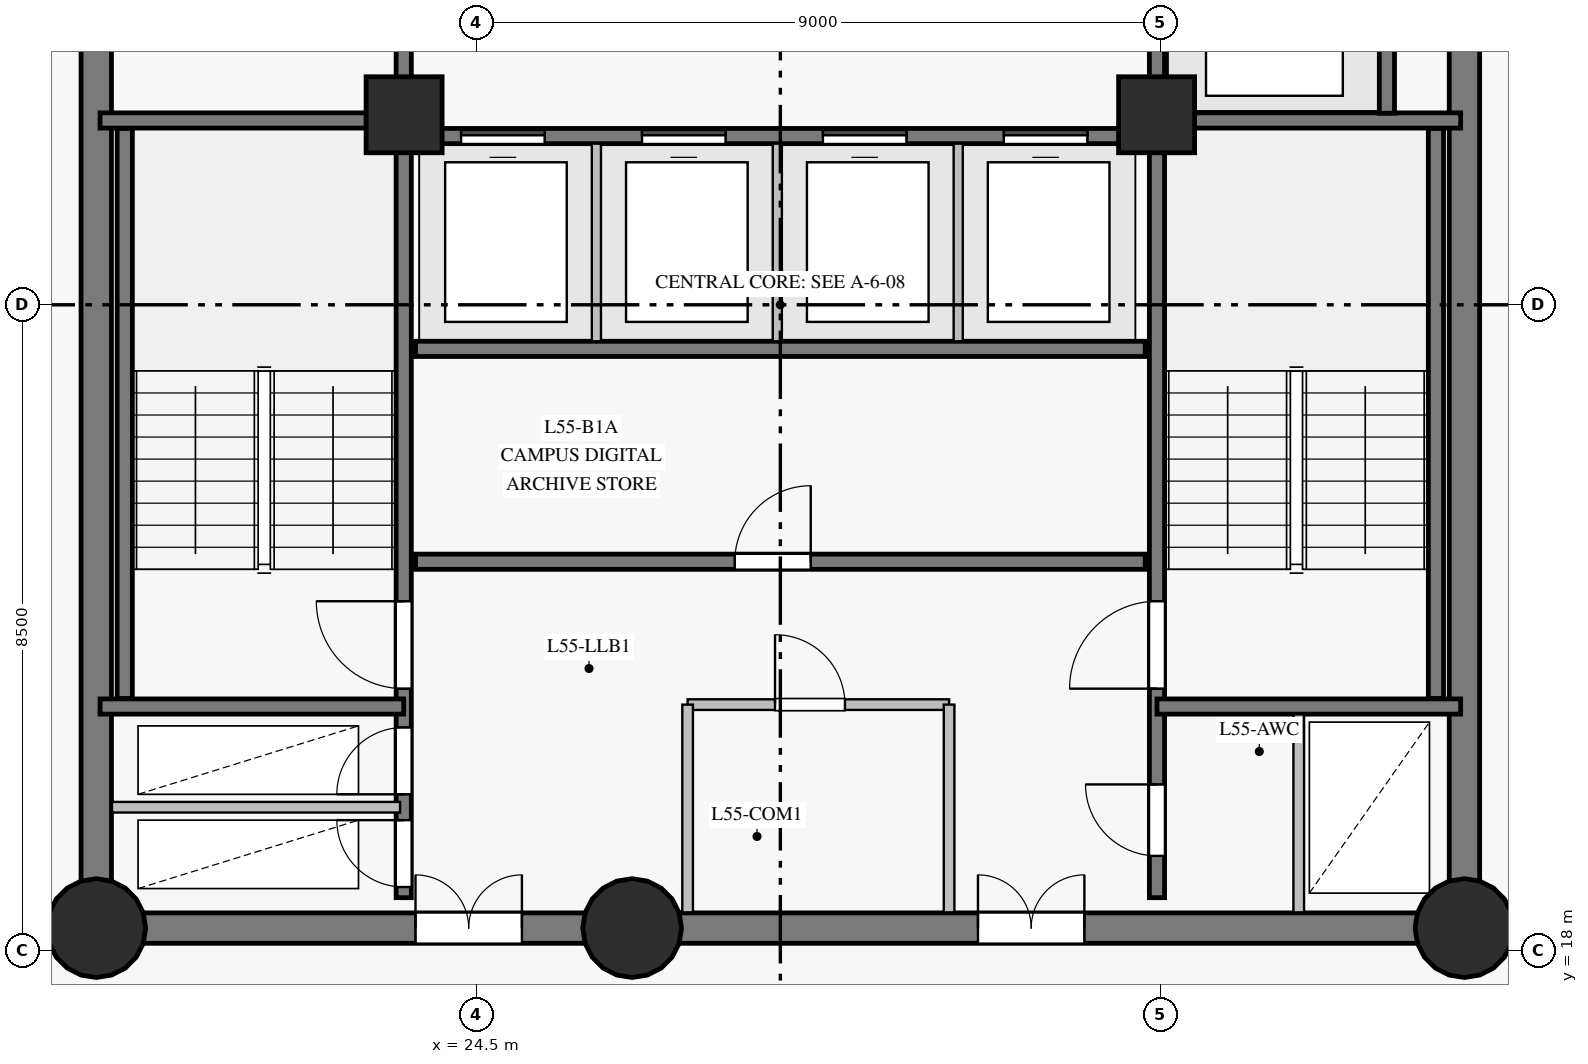
"""IFC4 building model, lengths in metres.
Left out: names, types, materials, properties, quantities, classifications, styles, units other than length and angle.
Written with IfcOpenShell. Run it as: python <this file> out.ifc"""

import sys

from ifc_helpers import new_model, si_unit, direction, frame, frame_2d, origin, origin_with_axes, origin_2d, place, context, subcontext, project, spatial, rectangle, circle, extrude, source, transform, mapped, element, fill, save


model = new_model("IFC4")
c1 = context("Model", 3, precision=1e-05, world=origin(), true_north=direction((0.0, 1.0)))
c2 = subcontext(c1, "Body", "Model", "MODEL_VIEW")
j1 = project(units=[si_unit("LENGTHUNIT", "METRE"), si_unit("PLANEANGLEUNIT", "RADIAN")], contexts=[c1])
p1 = place(None, origin())
s1 = spatial("IfcSite", under=j1, at=p1, CompositionType="ELEMENT")
p2 = place(p1, origin())
s2 = spatial("IfcBuilding", under=s1, at=p2, CompositionType="ELEMENT")
p3 = place(p2, frame((0.0, 0.0, 190.1)))
s3 = spatial("IfcBuildingStorey", under=s2, at=p3, CompositionType="ELEMENT", Elevation=190.1)
p4 = place(p3, frame((19.5, 18.3, 0.0), z_axis=(0.0, 0.0, 1.0), x_axis=(1.0, 0.0, 0.0)))
e1 = element("IfcWall", 1, at=p4, inside=s3, PredefinedType="SHEAR", context=c2, shape_type="SweptSolid", body=[
    extrude(rectangle(XDim=7.05, YDim=0.4, at=frame_2d((3.525, 0.0))), origin(), (0.0, 0.0, 1.0), 2.825),
])
p5 = place(p4, frame((4.2, 0.0, 0.0)))
e2 = element("IfcOpeningElement", 2, at=p5, cuts=e1, PredefinedType="OPENING", context=c2, shape_type="SweptSolid", body=[
    extrude(rectangle(XDim=1.4, YDim=2.2, at=frame_2d((0.7, 1.1))), frame((0.0, 0.21, 0.0), z_axis=(0.0, -1.0, 0.0), x_axis=(1.0, 0.0, 0.0)), (0.0, 0.0, 1.0), 0.42),
])
p6 = place(p3, frame((26.55, 18.3, 0.0), z_axis=(0.0, 0.0, 1.0), x_axis=(1.0, 0.0, 0.0)))
e3 = element("IfcWall", 3, at=p6, inside=s3, PredefinedType="SHEAR", context=c2, shape_type="SweptSolid", body=[
    extrude(rectangle(XDim=10.95, YDim=0.4, at=frame_2d((5.475, 0.0))), origin(), (0.0, 0.0, 1.0), 2.825),
])
p7 = place(p6, frame((4.55, 0.0, 0.0)))
e4 = element("IfcOpeningElement", 4, at=p7, cuts=e3, PredefinedType="OPENING", context=c2, shape_type="SweptSolid", body=[
    extrude(rectangle(XDim=1.4, YDim=2.2, at=frame_2d((0.7, 1.1))), frame((0.0, 0.21, 0.0), z_axis=(0.0, -1.0, 0.0), x_axis=(1.0, 0.0, 0.0)), (0.0, 0.0, 1.0), 0.42),
])
p8 = place(p3, frame((37.5, 18.3, 0.0), z_axis=(0.0, 0.0, 1.0), x_axis=(0.0, 1.0, 0.0)))
e5 = element("IfcWall", 5, at=p8, inside=s3, PredefinedType="SHEAR", context=c2, shape_type="SweptSolid", body=[
    extrude(rectangle(XDim=16.4, YDim=0.4, at=frame_2d((8.2, 0.0))), origin(), (0.0, 0.0, 1.0), 2.825),
])
p9 = place(p8, frame((14.15, 0.0, 0.0)))
e6 = element("IfcOpeningElement", 6, at=p9, cuts=e5, PredefinedType="OPENING", context=c2, shape_type="SweptSolid", body=[
    extrude(rectangle(XDim=1.2, YDim=2.15, at=frame_2d((0.6, 1.075))), frame((0.0, 0.21, 0.0), z_axis=(0.0, -1.0, 0.0), x_axis=(1.0, 0.0, 0.0)), (0.0, 0.0, 1.0), 0.42),
])
p10 = place(p3, frame((19.5, 34.7, 0.0), z_axis=(0.0, 0.0, 1.0), x_axis=(0.0, -1.0, 0.0)))
e7 = element("IfcWall", 7, at=p10, inside=s3, PredefinedType="SHEAR", context=c2, shape_type="SweptSolid", body=[
    extrude(rectangle(XDim=16.4, YDim=0.4, at=frame_2d((8.2, 0.0))), origin(), (0.0, 0.0, 1.0), 2.825),
])
p11 = place(p10, frame((3.1, 0.0, 0.0)))
e8 = element("IfcOpeningElement", 8, at=p11, cuts=e7, PredefinedType="OPENING", context=c2, shape_type="SweptSolid", body=[
    extrude(rectangle(XDim=1.1, YDim=2.15, at=frame_2d((0.55, 1.075))), frame((0.0, 0.21, 0.0), z_axis=(0.0, -1.0, 0.0), x_axis=(1.0, 0.0, 0.0)), (0.0, 0.0, 1.0), 0.42),
])
m1 = source(origin_with_axes(), c2, "Body", "SweptSolid", [
    extrude(circle(Radius=0.65, at=origin_2d()), origin(), (0.0, 0.0, 1.0), 3.05),
])
for number, where, z_axis, x_axis in (
    (9, (19.5, 18.3, 0.0), (0.0, 0.0, 1.0), (1.0, 0.0, 0.0)),
    (10, (26.55, 18.3, 0.0), (0.0, 0.0, 1.0), (1.0, 0.0, 0.0)),
    (11, (37.5, 18.3, 0.0), (0.0, 0.0, 1.0), (1.0, 0.0, 0.0)),
):
    element("IfcColumn", number, at=place(p3, frame(where, z_axis=z_axis, x_axis=x_axis)), inside=s3, PredefinedType="COLUMN", context=c2, shape_type="MappedRepresentation", body=[
        mapped(m1, transform((0.0, 0.0, 0.0), scale=1.0)),
    ])
m2 = source(origin_with_axes(), c2, "Body", "SweptSolid", [
    extrude(rectangle(XDim=1.0, YDim=1.0, at=origin_2d()), origin(), (0.0, 0.0, 1.0), 3.05),
])
for number, where, z_axis, x_axis in (
    (12, (23.55, 29.0, 0.0), (0.0, 0.0, 1.0), (1.0, 0.0, 0.0)),
    (13, (33.45, 29.0, 0.0), (0.0, 0.0, 1.0), (1.0, 0.0, 0.0)),
):
    element("IfcColumn", number, at=place(p3, frame(where, z_axis=z_axis, x_axis=x_axis)), inside=s3, PredefinedType="COLUMN", context=c2, shape_type="MappedRepresentation", body=[
        mapped(m2, transform((0.0, 0.0, 0.0), scale=1.0)),
    ])
p12 = place(p3, frame((23.545, 18.7, 0.0), z_axis=(0.0, 0.0, 1.0), x_axis=(0.0, 1.0, 0.0)))
e14 = element("IfcWall", 14, at=p12, inside=s3, PredefinedType="SHEAR", context=c2, shape_type="SweptSolid", body=[
    extrude(rectangle(XDim=15.6, YDim=0.2, at=frame_2d((7.8, 0.0))), origin(), (0.0, 0.0, 1.0), 2.825),
])
p13 = place(p12, frame((2.75, 0.0, 0.0)))
e15 = element("IfcOpeningElement", 15, at=p13, cuts=e14, PredefinedType="OPENING", context=c2, shape_type="SweptSolid", body=[
    extrude(rectangle(XDim=1.15, YDim=2.15, at=frame_2d((0.575, 1.075))), frame((0.0, 0.11, 0.0), z_axis=(0.0, -1.0, 0.0), x_axis=(1.0, 0.0, 0.0)), (0.0, 0.0, 1.0), 0.22),
])
p14 = place(p12, frame((0.14, 0.0, 0.0)))
e16 = element("IfcOpeningElement", 16, at=p14, cuts=e14, PredefinedType="OPENING", context=c2, shape_type="SweptSolid", body=[
    extrude(rectangle(XDim=0.88, YDim=2.1, at=frame_2d((0.44, 1.05))), frame((0.0, 0.11, 0.0), z_axis=(0.0, -1.0, 0.0), x_axis=(1.0, 0.0, 0.0)), (0.0, 0.0, 1.0), 0.22),
])
p15 = place(p12, frame((1.36, 0.0, 0.0)))
e17 = element("IfcOpeningElement", 17, at=p15, cuts=e14, PredefinedType="OPENING", context=c2, shape_type="SweptSolid", body=[
    extrude(rectangle(XDim=0.88, YDim=2.1, at=frame_2d((0.44, 1.05))), frame((0.0, 0.11, 0.0), z_axis=(0.0, -1.0, 0.0), x_axis=(1.0, 0.0, 0.0)), (0.0, 0.0, 1.0), 0.22),
])
p16 = place(p12, frame((12.1, 0.0, 0.0)))
e18 = element("IfcOpeningElement", 18, at=p16, cuts=e14, PredefinedType="OPENING", context=c2, shape_type="SweptSolid", body=[
    extrude(rectangle(XDim=1.12, YDim=2.15, at=frame_2d((0.56, 1.075))), frame((0.0, 0.11, 0.0), z_axis=(0.0, -1.0, 0.0), x_axis=(1.0, 0.0, 0.0)), (0.0, 0.0, 1.0), 0.22),
])
p17 = place(p12, frame((14.05, 0.0, 0.0)))
e19 = element("IfcOpeningElement", 19, at=p17, cuts=e14, PredefinedType="OPENING", context=c2, shape_type="SweptSolid", body=[
    extrude(rectangle(XDim=1.12, YDim=2.15, at=frame_2d((0.56, 1.075))), frame((0.0, 0.11, 0.0), z_axis=(0.0, -1.0, 0.0), x_axis=(1.0, 0.0, 0.0)), (0.0, 0.0, 1.0), 0.22),
])
p18 = place(p3, frame((33.455, 18.7, 0.0), z_axis=(0.0, 0.0, 1.0), x_axis=(0.0, 1.0, 0.0)))
e20 = element("IfcWall", 20, at=p18, inside=s3, PredefinedType="SHEAR", context=c2, shape_type="SweptSolid", body=[
    extrude(rectangle(XDim=15.6, YDim=0.2, at=frame_2d((7.8, 0.0))), origin(), (0.0, 0.0, 1.0), 2.825),
])
p19 = place(p18, frame((2.75, 0.0, 0.0)))
e21 = element("IfcOpeningElement", 21, at=p19, cuts=e20, PredefinedType="OPENING", context=c2, shape_type="SweptSolid", body=[
    extrude(rectangle(XDim=1.15, YDim=2.15, at=frame_2d((0.575, 1.075))), frame((0.0, 0.11, 0.0), z_axis=(0.0, -1.0, 0.0), x_axis=(1.0, 0.0, 0.0)), (0.0, 0.0, 1.0), 0.22),
])
p20 = place(p18, frame((0.55, 0.0, 0.0)))
e22 = element("IfcOpeningElement", 22, at=p20, cuts=e20, PredefinedType="OPENING", context=c2, shape_type="SweptSolid", body=[
    extrude(rectangle(XDim=0.94, YDim=2.1, at=frame_2d((0.47, 1.05))), frame((0.0, 0.11, 0.0), z_axis=(0.0, -1.0, 0.0), x_axis=(1.0, 0.0, 0.0)), (0.0, 0.0, 1.0), 0.22),
])
p21 = place(p3, frame((23.7, 23.12, 0.0), z_axis=(0.0, 0.0, 1.0), x_axis=(1.0, 0.0, 0.0)))
e23 = element("IfcWall", 23, at=p21, inside=s3, PredefinedType="SHEAR", context=c2, shape_type="SweptSolid", body=[
    extrude(rectangle(XDim=9.6, YDim=0.2, at=frame_2d((4.8, 0.0))), origin(), (0.0, 0.0, 1.0), 2.825),
])
p22 = place(p21, frame((4.2, 0.0, 0.0)))
e24 = element("IfcOpeningElement", 24, at=p22, cuts=e23, PredefinedType="OPENING", context=c2, shape_type="SweptSolid", body=[
    extrude(rectangle(XDim=1.0, YDim=2.15, at=frame_2d((0.5, 1.075))), frame((0.0, 0.11, 0.0), z_axis=(0.0, -1.0, 0.0), x_axis=(1.0, 0.0, 0.0)), (0.0, 0.0, 1.0), 0.22),
])
p23 = place(p3, frame((23.7, 25.92, 0.0), z_axis=(0.0, 0.0, 1.0), x_axis=(1.0, 0.0, 0.0)))
e25 = element("IfcWall", 25, at=p23, inside=s3, PredefinedType="SHEAR", context=c2, shape_type="SweptSolid", body=[
    extrude(rectangle(XDim=9.6, YDim=0.2, at=frame_2d((4.8, 0.0))), origin(), (0.0, 0.0, 1.0), 2.825),
])
p24 = place(p3, frame((23.7, 28.72, 0.0), z_axis=(0.0, 0.0, 1.0), x_axis=(1.0, 0.0, 0.0)))
e26 = element("IfcWall", 26, at=p24, inside=s3, PredefinedType="SHEAR", context=c2, shape_type="SweptSolid", body=[
    extrude(rectangle(XDim=9.6, YDim=0.2, at=frame_2d((4.8, 0.0))), origin(), (0.0, 0.0, 1.0), 2.825),
])
p25 = place(p24, frame((0.6, 0.0, 0.0)))
e27 = element("IfcOpeningElement", 27, at=p25, cuts=e26, PredefinedType="OPENING", context=c2, shape_type="SweptSolid", body=[
    extrude(rectangle(XDim=1.1, YDim=2.15, at=frame_2d((0.55, 1.075))), frame((0.0, 0.11, 0.0), z_axis=(0.0, -1.0, 0.0), x_axis=(1.0, 0.0, 0.0)), (0.0, 0.0, 1.0), 0.22),
])
p26 = place(p24, frame((2.98, 0.0, 0.0)))
e28 = element("IfcOpeningElement", 28, at=p26, cuts=e26, PredefinedType="OPENING", context=c2, shape_type="SweptSolid", body=[
    extrude(rectangle(XDim=1.1, YDim=2.15, at=frame_2d((0.55, 1.075))), frame((0.0, 0.11, 0.0), z_axis=(0.0, -1.0, 0.0), x_axis=(1.0, 0.0, 0.0)), (0.0, 0.0, 1.0), 0.22),
])
p27 = place(p24, frame((5.36, 0.0, 0.0)))
e29 = element("IfcOpeningElement", 29, at=p27, cuts=e26, PredefinedType="OPENING", context=c2, shape_type="SweptSolid", body=[
    extrude(rectangle(XDim=1.1, YDim=2.15, at=frame_2d((0.55, 1.075))), frame((0.0, 0.11, 0.0), z_axis=(0.0, -1.0, 0.0), x_axis=(1.0, 0.0, 0.0)), (0.0, 0.0, 1.0), 0.22),
])
p28 = place(p24, frame((7.74, 0.0, 0.0)))
e30 = element("IfcOpeningElement", 30, at=p28, cuts=e26, PredefinedType="OPENING", context=c2, shape_type="SweptSolid", body=[
    extrude(rectangle(XDim=1.1, YDim=2.15, at=frame_2d((0.55, 1.075))), frame((0.0, 0.11, 0.0), z_axis=(0.0, -1.0, 0.0), x_axis=(1.0, 0.0, 0.0)), (0.0, 0.0, 1.0), 0.22),
])
for number, where, z_axis, x_axis in (
    (31, (19.875, 21.32, 0.0), (0.0, 0.0, 1.0), (0.0, 1.0, 0.0)),
    (32, (37.125, 21.32, 0.0), (0.0, 0.0, 1.0), (0.0, 1.0, 0.0)),
):
    element("IfcWall", number, at=place(p3, frame(where, z_axis=z_axis, x_axis=x_axis)), inside=s3, PredefinedType="SHEAR", context=c2, shape_type="SweptSolid", body=[
        extrude(rectangle(XDim=7.5, YDim=0.2, at=frame_2d((3.75, 0.0))), origin(), (0.0, 0.0, 1.0), 2.825),
    ])
for number, where, z_axis, x_axis in (
    (33, (33.455, 21.215, 0.0), (0.0, 0.0, 1.0), (1.0, 0.0, 0.0)),
    (34, (33.455, 28.925, 0.0), (0.0, 0.0, 1.0), (1.0, 0.0, 0.0)),
    (35, (19.55, 21.215, 0.0), (0.0, 0.0, 1.0), (1.0, 0.0, 0.0)),
    (36, (19.55, 28.925, 0.0), (0.0, 0.0, 1.0), (1.0, 0.0, 0.0)),
):
    element("IfcWall", number, at=place(p3, frame(where, z_axis=z_axis, x_axis=x_axis)), inside=s3, PredefinedType="SHEAR", context=c2, shape_type="SweptSolid", body=[
        extrude(rectangle(XDim=3.995, YDim=0.2, at=frame_2d((1.998, 0.0))), origin(), (0.0, 0.0, 1.0), 2.825),
    ])
p29 = place(p3, frame((36.48, 29.02, 0.0), z_axis=(0.0, 0.0, 1.0), x_axis=(0.0, 1.0, 0.0)))
e37 = element("IfcWall", 37, at=p29, inside=s3, PredefinedType="SHEAR", context=c2, shape_type="SweptSolid", body=[
    extrude(rectangle(XDim=2.86, YDim=0.2, at=frame_2d((1.43, 0.0))), origin(), (0.0, 0.0, 1.0), 2.825),
])
p30 = place(p3, frame((19.707, 19.89, 0.0), z_axis=(0.0, 0.0, 1.0), x_axis=(1.0, 0.0, 0.0)))
e38 = element("IfcWall", 38, at=p30, inside=s3, PredefinedType="PARTITIONING", context=c2, shape_type="SweptSolid", body=[
    extrude(rectangle(XDim=3.79, YDim=0.14, at=frame_2d((1.895, 0.0))), origin(), (0.0, 0.0, 1.0), 2.825),
])
p31 = place(p3, frame((27.28, 21.24, 0.0), z_axis=(0.0, 0.0, 1.0), x_axis=(1.0, 0.0, 0.0)))
e39 = element("IfcWall", 39, at=p31, inside=s3, PredefinedType="PARTITIONING", context=c2, shape_type="SweptSolid", body=[
    extrude(rectangle(XDim=3.44, YDim=0.14, at=frame_2d((1.72, 0.0))), origin(), (0.0, 0.0, 1.0), 2.825),
])
p32 = place(p31, frame((1.15, 0.0, 0.0)))
e40 = element("IfcOpeningElement", 40, at=p32, cuts=e39, PredefinedType="OPENING", context=c2, shape_type="SweptSolid", body=[
    extrude(rectangle(XDim=0.92, YDim=2.1, at=frame_2d((0.46, 1.05))), frame((0.0, 0.08, 0.0), z_axis=(0.0, -1.0, 0.0), x_axis=(1.0, 0.0, 0.0)), (0.0, 0.0, 1.0), 0.16),
])
for number, where, z_axis, x_axis in (
    (41, (27.28, 18.507, 0.0), (0.0, 0.0, 1.0), (0.0, 1.0, 0.0)),
    (42, (30.72, 18.507, 0.0), (0.0, 0.0, 1.0), (0.0, 1.0, 0.0)),
):
    element("IfcWall", number, at=place(p3, frame(where, z_axis=z_axis, x_axis=x_axis)), inside=s3, PredefinedType="PARTITIONING", context=c2, shape_type="SweptSolid", body=[
        extrude(rectangle(XDim=2.733, YDim=0.14, at=frame_2d((1.366, 0.0))), origin(), (0.0, 0.0, 1.0), 2.825),
    ])
for number, where, z_axis, x_axis in (
    (43, (26.08, 26.02, 0.0), (0.0, 0.0, 1.0), (0.0, 1.0, 0.0)),
    (44, (28.46, 26.02, 0.0), (0.0, 0.0, 1.0), (0.0, 1.0, 0.0)),
    (45, (30.84, 26.02, 0.0), (0.0, 0.0, 1.0), (0.0, 1.0, 0.0)),
):
    element("IfcWall", number, at=place(p3, frame(where, z_axis=z_axis, x_axis=x_axis)), inside=s3, PredefinedType="PARTITIONING", context=c2, shape_type="SweptSolid", body=[
        extrude(rectangle(XDim=2.6, YDim=0.12, at=frame_2d((1.3, 0.0))), origin(), (0.0, 0.0, 1.0), 2.825),
    ])
p33 = place(p3, frame((35.32, 18.507, 0.0), z_axis=(0.0, 0.0, 1.0), x_axis=(0.0, 1.0, 0.0)))
e46 = element("IfcWall", 46, at=p33, inside=s3, PredefinedType="PARTITIONING", context=c2, shape_type="SweptSolid", body=[
    extrude(rectangle(XDim=2.604, YDim=0.14, at=frame_2d((1.302, 0.0))), origin(), (0.0, 0.0, 1.0), 2.825),
])
m3 = source(origin_with_axes(), c2, "Body", "SweptSolid", [
    extrude(rectangle(XDim=1.15, YDim=2.15, at=frame_2d((0.575, 1.075))), frame((0.0, 0.025, 0.0), z_axis=(0.0, -1.0, 0.0), x_axis=(1.0, 0.0, 0.0)), (0.0, 0.0, 1.0), 0.05),
])
p34 = place(p13, origin())
e47 = element("IfcDoor", 47, at=p34, inside=s3, OperationType="SINGLE_SWING_RIGHT", PredefinedType="DOOR", context=c2, shape_type="MappedRepresentation", body=[
    mapped(m3, transform((0.0, 0.0, 0.0), scale=1.0)),
])
fill(e15, e47)
p35 = place(p19, origin())
e48 = element("IfcDoor", 48, at=p35, inside=s3, OperationType="SINGLE_SWING_LEFT", PredefinedType="DOOR", context=c2, shape_type="MappedRepresentation", body=[
    mapped(m3, transform((0.0, 0.0, 0.0), scale=1.0)),
])
fill(e21, e48)
m4 = source(origin_with_axes(), c2, "Body", "SweptSolid", [
    extrude(rectangle(XDim=0.88, YDim=2.1, at=frame_2d((0.44, 1.05))), frame((0.0, 0.025, 0.0), z_axis=(0.0, -1.0, 0.0), x_axis=(1.0, 0.0, 0.0)), (0.0, 0.0, 1.0), 0.05),
])
p36 = place(p14, origin())
e49 = element("IfcDoor", 49, at=p36, inside=s3, OperationType="SINGLE_SWING_RIGHT", PredefinedType="DOOR", context=c2, shape_type="MappedRepresentation", body=[
    mapped(m4, transform((0.0, 0.0, 0.0), scale=1.0)),
])
fill(e16, e49)
p37 = place(p15, origin())
e50 = element("IfcDoor", 50, at=p37, inside=s3, OperationType="SINGLE_SWING_LEFT", PredefinedType="DOOR", context=c2, shape_type="MappedRepresentation", body=[
    mapped(m4, transform((0.0, 0.0, 0.0), scale=1.0)),
])
fill(e17, e50)
m5 = source(origin_with_axes(), c2, "Body", "SweptSolid", [
    extrude(rectangle(XDim=1.4, YDim=2.2, at=frame_2d((0.7, 1.1))), frame((0.0, 0.025, 0.0), z_axis=(0.0, -1.0, 0.0), x_axis=(1.0, 0.0, 0.0)), (0.0, 0.0, 1.0), 0.05),
])
p38 = place(p5, origin())
e51 = element("IfcDoor", 51, at=p38, inside=s3, OperationType="DOUBLE_DOOR_SINGLE_SWING", PredefinedType="DOOR", context=c2, shape_type="MappedRepresentation", body=[
    mapped(m5, transform((0.0, 0.0, 0.0), scale=1.0)),
])
fill(e2, e51)
p39 = place(p7, origin())
e52 = element("IfcDoor", 52, at=p39, inside=s3, OperationType="DOUBLE_DOOR_SINGLE_SWING", PredefinedType="DOOR", context=c2, shape_type="MappedRepresentation", body=[
    mapped(m5, transform((0.0, 0.0, 0.0), scale=1.0)),
])
fill(e4, e52)
m6 = source(origin_with_axes(), c2, "Body", "SweptSolid", [
    extrude(rectangle(XDim=0.94, YDim=2.1, at=frame_2d((0.47, 1.05))), frame((0.0, 0.025, 0.0), z_axis=(0.0, -1.0, 0.0), x_axis=(1.0, 0.0, 0.0)), (0.0, 0.0, 1.0), 0.05),
])
p40 = place(p20, origin())
e53 = element("IfcDoor", 53, at=p40, inside=s3, OperationType="SINGLE_SWING_RIGHT", PredefinedType="DOOR", context=c2, shape_type="MappedRepresentation", body=[
    mapped(m6, transform((0.0, 0.0, 0.0), scale=1.0)),
])
fill(e22, e53)
m7 = source(origin_with_axes(), c2, "Body", "SweptSolid", [
    extrude(rectangle(XDim=0.92, YDim=2.1, at=frame_2d((0.46, 1.05))), frame((0.0, 0.025, 0.0), z_axis=(0.0, -1.0, 0.0), x_axis=(1.0, 0.0, 0.0)), (0.0, 0.0, 1.0), 0.05),
])
p41 = place(p32, origin())
e54 = element("IfcDoor", 54, at=p41, inside=s3, OperationType="SINGLE_SWING_LEFT", PredefinedType="DOOR", context=c2, shape_type="MappedRepresentation", body=[
    mapped(m7, transform((0.0, 0.0, 0.0), scale=1.0)),
])
fill(e40, e54)
m8 = source(origin_with_axes(), c2, "Body", "SweptSolid", [
    extrude(rectangle(XDim=1.0, YDim=2.15, at=frame_2d((0.5, 1.075))), frame((0.0, 0.025, 0.0), z_axis=(0.0, -1.0, 0.0), x_axis=(1.0, 0.0, 0.0)), (0.0, 0.0, 1.0), 0.05),
])
p42 = place(p22, origin())
e55 = element("IfcDoor", 55, at=p42, inside=s3, OperationType="SINGLE_SWING_RIGHT", PredefinedType="DOOR", context=c2, shape_type="MappedRepresentation", body=[
    mapped(m8, transform((0.0, 0.0, 0.0), scale=1.0)),
])
fill(e24, e55)
m9 = source(origin_with_axes(), c2, "Body", "SweptSolid", [
    extrude(rectangle(XDim=1.1, YDim=2.15, at=frame_2d((0.55, 1.075))), frame((0.0, 0.025, 0.0), z_axis=(0.0, -1.0, 0.0), x_axis=(1.0, 0.0, 0.0)), (0.0, 0.0, 1.0), 0.05),
])
p43 = place(p25, origin())
e56 = element("IfcDoor", 56, at=p43, inside=s3, OperationType="SLIDING_TO_LEFT", PredefinedType="DOOR", context=c2, shape_type="MappedRepresentation", body=[
    mapped(m9, transform((0.0, 0.0, 0.0), scale=1.0)),
])
fill(e27, e56)
p44 = place(p26, origin())
e57 = element("IfcDoor", 57, at=p44, inside=s3, OperationType="SLIDING_TO_RIGHT", PredefinedType="DOOR", context=c2, shape_type="MappedRepresentation", body=[
    mapped(m9, transform((0.0, 0.0, 0.0), scale=1.0)),
])
fill(e28, e57)
p45 = place(p27, origin())
e58 = element("IfcDoor", 58, at=p45, inside=s3, OperationType="SLIDING_TO_LEFT", PredefinedType="DOOR", context=c2, shape_type="MappedRepresentation", body=[
    mapped(m9, transform((0.0, 0.0, 0.0), scale=1.0)),
])
fill(e29, e58)
p46 = place(p28, origin())
e59 = element("IfcDoor", 59, at=p46, inside=s3, OperationType="SLIDING_TO_RIGHT", PredefinedType="DOOR", context=c2, shape_type="MappedRepresentation", body=[
    mapped(m9, transform((0.0, 0.0, 0.0), scale=1.0)),
])
fill(e30, e59)
save(model, sys.argv[1])
